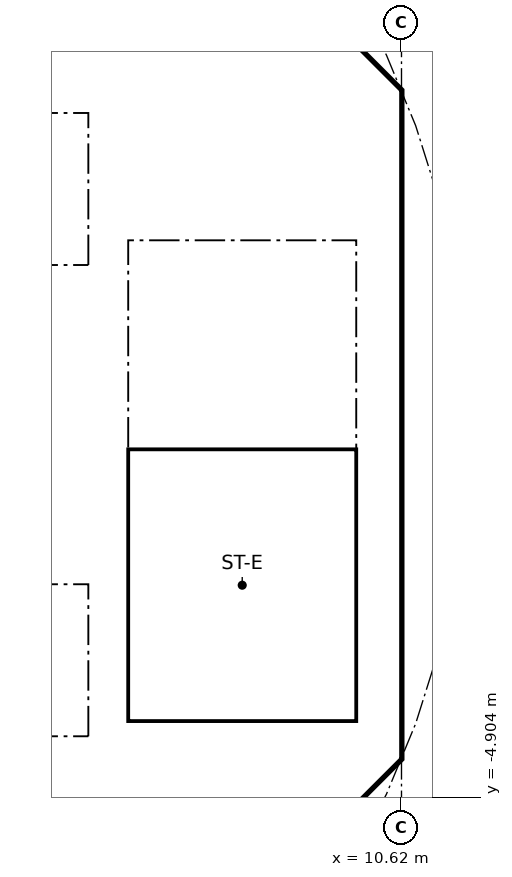
"""IFC4 building model, lengths in metres.
Left out: names, types, materials, properties, quantities, classifications, styles, units other than length and angle.
Written with IfcOpenShell. Run it as: python <this file> out.ifc"""

import sys

from ifc_helpers import new_model, si_unit, direction, frame, frame_2d, origin, place, context, subcontext, project, spatial, polyline, rectangle, outline, extrude, element, fill, save


model = new_model("IFC4")
c1 = context("Model", 3, precision=1e-05, world=origin(), true_north=direction((0.0, 1.0)))
c2 = subcontext(c1, "Body", "Model", "MODEL_VIEW")
j1 = project(units=[si_unit("LENGTHUNIT", "METRE"), si_unit("PLANEANGLEUNIT", "RADIAN")], contexts=[c1])
p1 = place(None, origin())
s1 = spatial("IfcSite", under=j1, at=p1, CompositionType="ELEMENT")
p2 = place(p1, origin())
s2 = spatial("IfcBuilding", under=s1, at=p2, CompositionType="ELEMENT")
p3 = place(p2, frame((0.0, 0.0, 291.8)))
s3 = spatial("IfcBuildingStorey", under=s2, at=p3, CompositionType="ELEMENT", Elevation=291.8)
p4 = place(p3, frame((9.988, 4.613, 0.0), z_axis=(0.0, 0.0, 1.0), x_axis=(-0.707106781187, 0.707106781187, 0.0)))
e1 = element("IfcWall", 1, at=p4, inside=s3, PredefinedType="SHEAR", context=c2, shape_type="SweptSolid", body=[
    extrude(rectangle(XDim=7.602, YDim=0.6, at=frame_2d((3.801, 0.0))), origin(), (0.0, 0.0, 1.0), 3.44),
])
p5 = place(p4, frame((3.201, 0.0, 0.0)))
e2 = element("IfcOpeningElement", 2, at=p5, cuts=e1, PredefinedType="OPENING", context=c2, shape_type="SweptSolid", body=[
    extrude(rectangle(XDim=1.2, YDim=2.1, at=frame_2d((0.6, 1.05))), frame((0.0, 0.31, 0.0), z_axis=(0.0, -1.0, 0.0), x_axis=(1.0, 0.0, 0.0)), (0.0, 0.0, 1.0), 0.62),
])
p6 = place(p3, frame((4.613, -9.988, 0.0), z_axis=(0.0, 0.0, 1.0), x_axis=(0.707106781187, 0.707106781187, 0.0)))
e3 = element("IfcWall", 3, at=p6, inside=s3, PredefinedType="SHEAR", context=c2, shape_type="SweptSolid", body=[
    extrude(rectangle(XDim=7.602, YDim=0.6, at=frame_2d((3.801, 0.0))), origin(), (0.0, 0.0, 1.0), 3.44),
])
p7 = place(p6, frame((3.201, 0.0, 0.0)))
e4 = element("IfcOpeningElement", 4, at=p7, cuts=e3, PredefinedType="OPENING", context=c2, shape_type="SweptSolid", body=[
    extrude(rectangle(XDim=1.2, YDim=2.1, at=frame_2d((0.6, 1.05))), frame((0.0, 0.31, 0.0), z_axis=(0.0, -1.0, 0.0), x_axis=(1.0, 0.0, 0.0)), (0.0, 0.0, 1.0), 0.62),
])
p8 = place(p3, frame((-6.7, 2.0, 0.0), z_axis=(0.0, 0.0, 1.0), x_axis=(1.0, 0.0, 0.0)))
e5 = element("IfcWall", 5, at=p8, inside=s3, PredefinedType="SOLIDWALL", context=c2, shape_type="SweptSolid", body=[
    extrude(rectangle(XDim=13.4, YDim=0.2, at=frame_2d((6.7, 0.0))), origin(), (0.0, 0.0, 1.0), 3.44),
])
p9 = place(p8, frame((11.65, 0.0, 0.0)))
e6 = element("IfcOpeningElement", 6, at=p9, cuts=e5, PredefinedType="OPENING", context=c2, shape_type="SweptSolid", body=[
    extrude(rectangle(XDim=1.1, YDim=2.1, at=frame_2d((0.55, 1.05))), frame((0.0, 0.11, 0.0), z_axis=(0.0, -1.0, 0.0), x_axis=(1.0, 0.0, 0.0)), (0.0, 0.0, 1.0), 0.22),
])
p10 = place(p8, frame((2.95, 0.0, 0.0)))
e7 = element("IfcOpeningElement", 7, at=p10, cuts=e5, PredefinedType="OPENING", context=c2, shape_type="SweptSolid", body=[
    extrude(rectangle(XDim=0.9, YDim=2.1, at=frame_2d((0.45, 1.05))), frame((0.0, 0.11, 0.0), z_axis=(0.0, -1.0, 0.0), x_axis=(1.0, 0.0, 0.0)), (0.0, 0.0, 1.0), 0.22),
])
p11 = place(p8, frame((8.45, 0.0, 0.0)))
e8 = element("IfcOpeningElement", 8, at=p11, cuts=e5, PredefinedType="OPENING", context=c2, shape_type="SweptSolid", body=[
    extrude(rectangle(XDim=0.9, YDim=2.1, at=frame_2d((0.45, 1.05))), frame((0.0, 0.11, 0.0), z_axis=(0.0, -1.0, 0.0), x_axis=(1.0, 0.0, 0.0)), (0.0, 0.0, 1.0), 0.22),
])
p12 = place(p3, frame((6.7, 4.0, 0.0), z_axis=(0.0, 0.0, 1.0), x_axis=(1.0, 0.0, 0.0)))
e9 = element("IfcWall", 9, at=p12, inside=s3, PredefinedType="SOLIDWALL", context=c2, shape_type="SweptSolid", body=[
    extrude(rectangle(XDim=3.325, YDim=0.2, at=frame_2d((1.662, 0.0))), origin(), (0.0, 0.0, 1.0), 3.44),
])
p13 = place(p12, frame((1.25, 0.0, 0.0)))
e10 = element("IfcOpeningElement", 10, at=p13, cuts=e9, PredefinedType="OPENING", context=c2, shape_type="SweptSolid", body=[
    extrude(rectangle(XDim=1.1, YDim=2.1, at=frame_2d((0.55, 1.05))), frame((0.0, 0.11, 0.0), z_axis=(0.0, -1.0, 0.0), x_axis=(1.0, 0.0, 0.0)), (0.0, 0.0, 1.0), 0.22),
])
p14 = place(p3, frame((-6.7, -2.0, 0.0), z_axis=(0.0, 0.0, 1.0), x_axis=(1.0, 0.0, 0.0)))
e11 = element("IfcWall", 11, at=p14, inside=s3, PredefinedType="SOLIDWALL", context=c2, shape_type="SweptSolid", body=[
    extrude(rectangle(XDim=13.4, YDim=0.2, at=frame_2d((6.7, 0.0))), origin(), (0.0, 0.0, 1.0), 3.44),
])
p15 = place(p14, frame((9.45, 0.0, 0.0)))
e12 = element("IfcOpeningElement", 12, at=p15, cuts=e11, PredefinedType="OPENING", context=c2, shape_type="SweptSolid", body=[
    extrude(rectangle(XDim=1.1, YDim=2.1, at=frame_2d((0.55, 1.05))), frame((0.0, 0.11, 0.0), z_axis=(0.0, -1.0, 0.0), x_axis=(1.0, 0.0, 0.0)), (0.0, 0.0, 1.0), 0.22),
])
p16 = place(p14, frame((11.65, 0.0, 0.0)))
e13 = element("IfcOpeningElement", 13, at=p16, cuts=e11, PredefinedType="OPENING", context=c2, shape_type="SweptSolid", body=[
    extrude(rectangle(XDim=1.1, YDim=2.1, at=frame_2d((0.55, 1.05))), frame((0.0, 0.11, 0.0), z_axis=(0.0, -1.0, 0.0), x_axis=(1.0, 0.0, 0.0)), (0.0, 0.0, 1.0), 0.22),
])
p17 = place(p14, frame((0.75, 0.0, 0.0)))
e14 = element("IfcOpeningElement", 14, at=p17, cuts=e11, PredefinedType="OPENING", context=c2, shape_type="SweptSolid", body=[
    extrude(rectangle(XDim=0.9, YDim=2.1, at=frame_2d((0.45, 1.05))), frame((0.0, 0.11, 0.0), z_axis=(0.0, -1.0, 0.0), x_axis=(1.0, 0.0, 0.0)), (0.0, 0.0, 1.0), 0.22),
])
p18 = place(p14, frame((2.95, 0.0, 0.0)))
e15 = element("IfcOpeningElement", 15, at=p18, cuts=e11, PredefinedType="OPENING", context=c2, shape_type="SweptSolid", body=[
    extrude(rectangle(XDim=0.9, YDim=2.1, at=frame_2d((0.45, 1.05))), frame((0.0, 0.11, 0.0), z_axis=(0.0, -1.0, 0.0), x_axis=(1.0, 0.0, 0.0)), (0.0, 0.0, 1.0), 0.22),
])
p19 = place(p14, frame((6.25, 0.0, 0.0)))
e16 = element("IfcOpeningElement", 16, at=p19, cuts=e11, PredefinedType="OPENING", context=c2, shape_type="SweptSolid", body=[
    extrude(rectangle(XDim=0.9, YDim=2.1, at=frame_2d((0.45, 1.05))), frame((0.0, 0.11, 0.0), z_axis=(0.0, -1.0, 0.0), x_axis=(1.0, 0.0, 0.0)), (0.0, 0.0, 1.0), 0.22),
])
p20 = place(p3, origin())
e17 = element("IfcWall", 17, at=p20, inside=s3, PredefinedType="SHEAR", context=c2, shape_type="SweptSolid", body=[
    extrude(outline(polyline([(9.776, -4.401), (10.025, -4.152), (10.025, -3.801), (10.025, 4.152), (9.776, 4.401), (10.2, 4.825), (10.625, 4.401), (10.625, -4.401), (10.2, -4.825), (9.776, -4.401)])), origin(), (0.0, 0.0, 1.0), 3.44),
])
p21 = place(p3, origin())
e18 = element("IfcWall", 18, at=p21, inside=s3, PredefinedType="SOLIDWALL", context=c2, shape_type="SweptSolid", body=[
    extrude(outline(polyline([(-6.7, -2.1), (-6.5, -2.1), (-6.5, -4.1), (-4.5, -4.1), (-4.5, -2.1), (-4.3, -2.1), (-4.3, -4.1), (-2.3, -4.1), (-2.3, -2.1), (-2.1, -2.1), (-2.1, -4.1), (2.1, -4.1), (2.1, -2.1), (2.3, -2.1), (2.3, -4.1), (4.3, -4.1), (4.3, -2.1), (4.5, -2.1), (4.5, -4.1), (6.5, -4.1), (6.5, -2.1), (6.7, -2.1), (6.7, -4.3), (-6.7, -4.3), (-6.7, -2.1)])), origin(), (0.0, 0.0, 1.0), 3.44),
])
p22 = place(p3, origin())
e19 = element("IfcWall", 19, at=p22, inside=s3, PredefinedType="SOLIDWALL", context=c2, shape_type="SweptSolid", body=[
    extrude(outline(polyline([(-6.7, 4.3), (6.7, 4.3), (6.7, 2.1), (6.5, 2.1), (6.5, 4.1), (4.5, 4.1), (4.5, 2.1), (4.3, 2.1), (4.3, 4.1), (0.1, 4.1), (0.1, 2.1), (-0.1, 2.1), (-0.1, 4.1), (-6.5, 4.1), (-6.5, 2.1), (-6.7, 2.1), (-6.7, 4.3)])), origin(), (0.0, 0.0, 1.0), 3.44),
])
p23 = place(p3, origin())
e20 = element("IfcWall", 20, at=p23, inside=s3, PredefinedType="SOLIDWALL", context=c2, shape_type="SweptSolid", body=[
    extrude(outline(polyline([(7.025, -3.9), (6.7, -3.9), (6.7, 3.9), (7.025, 3.9), (7.025, -3.9)])), origin(), (0.0, 0.0, 1.0), 3.44),
])
p24 = place(p3, origin())
e21 = element("IfcWall", 21, at=p24, inside=s3, PredefinedType="SOLIDWALL", context=c2, shape_type="SweptSolid", body=[
    extrude(outline(polyline([(10.025, -4.1), (6.7, -4.1), (6.7, -3.9), (10.025, -3.9), (10.025, -4.1)])), origin(), (0.0, 0.0, 1.0), 3.44),
])
p25 = place(p9, origin())
e22 = element("IfcDoor", 22, at=p25, inside=s3, OperationType="DOUBLE_DOOR_SLIDING", PredefinedType="DOOR", context=c2, shape_type="SweptSolid", body=[
    extrude(rectangle(XDim=1.1, YDim=2.1, at=frame_2d((0.55, 1.05))), frame((0.0, 0.025, 0.0), z_axis=(0.0, -1.0, 0.0), x_axis=(1.0, 0.0, 0.0)), (0.0, 0.0, 1.0), 0.05),
])
fill(e6, e22)
p26 = place(p16, origin())
e23 = element("IfcDoor", 23, at=p26, inside=s3, OperationType="DOUBLE_DOOR_SLIDING", PredefinedType="DOOR", context=c2, shape_type="SweptSolid", body=[
    extrude(rectangle(XDim=1.1, YDim=2.1, at=frame_2d((0.55, 1.05))), frame((0.0, 0.025, 0.0), z_axis=(0.0, -1.0, 0.0), x_axis=(1.0, 0.0, 0.0)), (0.0, 0.0, 1.0), 0.05),
])
fill(e13, e23)
p27 = place(p13, frame((1.1, 0.0, 0.0), x_axis=(-1.0, 0.0, 0.0)))
e24 = element("IfcDoor", 24, at=p27, inside=s3, OperationType="SINGLE_SWING_RIGHT", PredefinedType="DOOR", context=c2, shape_type="SweptSolid", body=[
    extrude(rectangle(XDim=1.1, YDim=2.1, at=frame_2d((0.55, 1.05))), frame((0.0, 0.025, 0.0), z_axis=(0.0, -1.0, 0.0), x_axis=(1.0, 0.0, 0.0)), (0.0, 0.0, 1.0), 0.05),
])
fill(e10, e24)
save(model, sys.argv[1])
